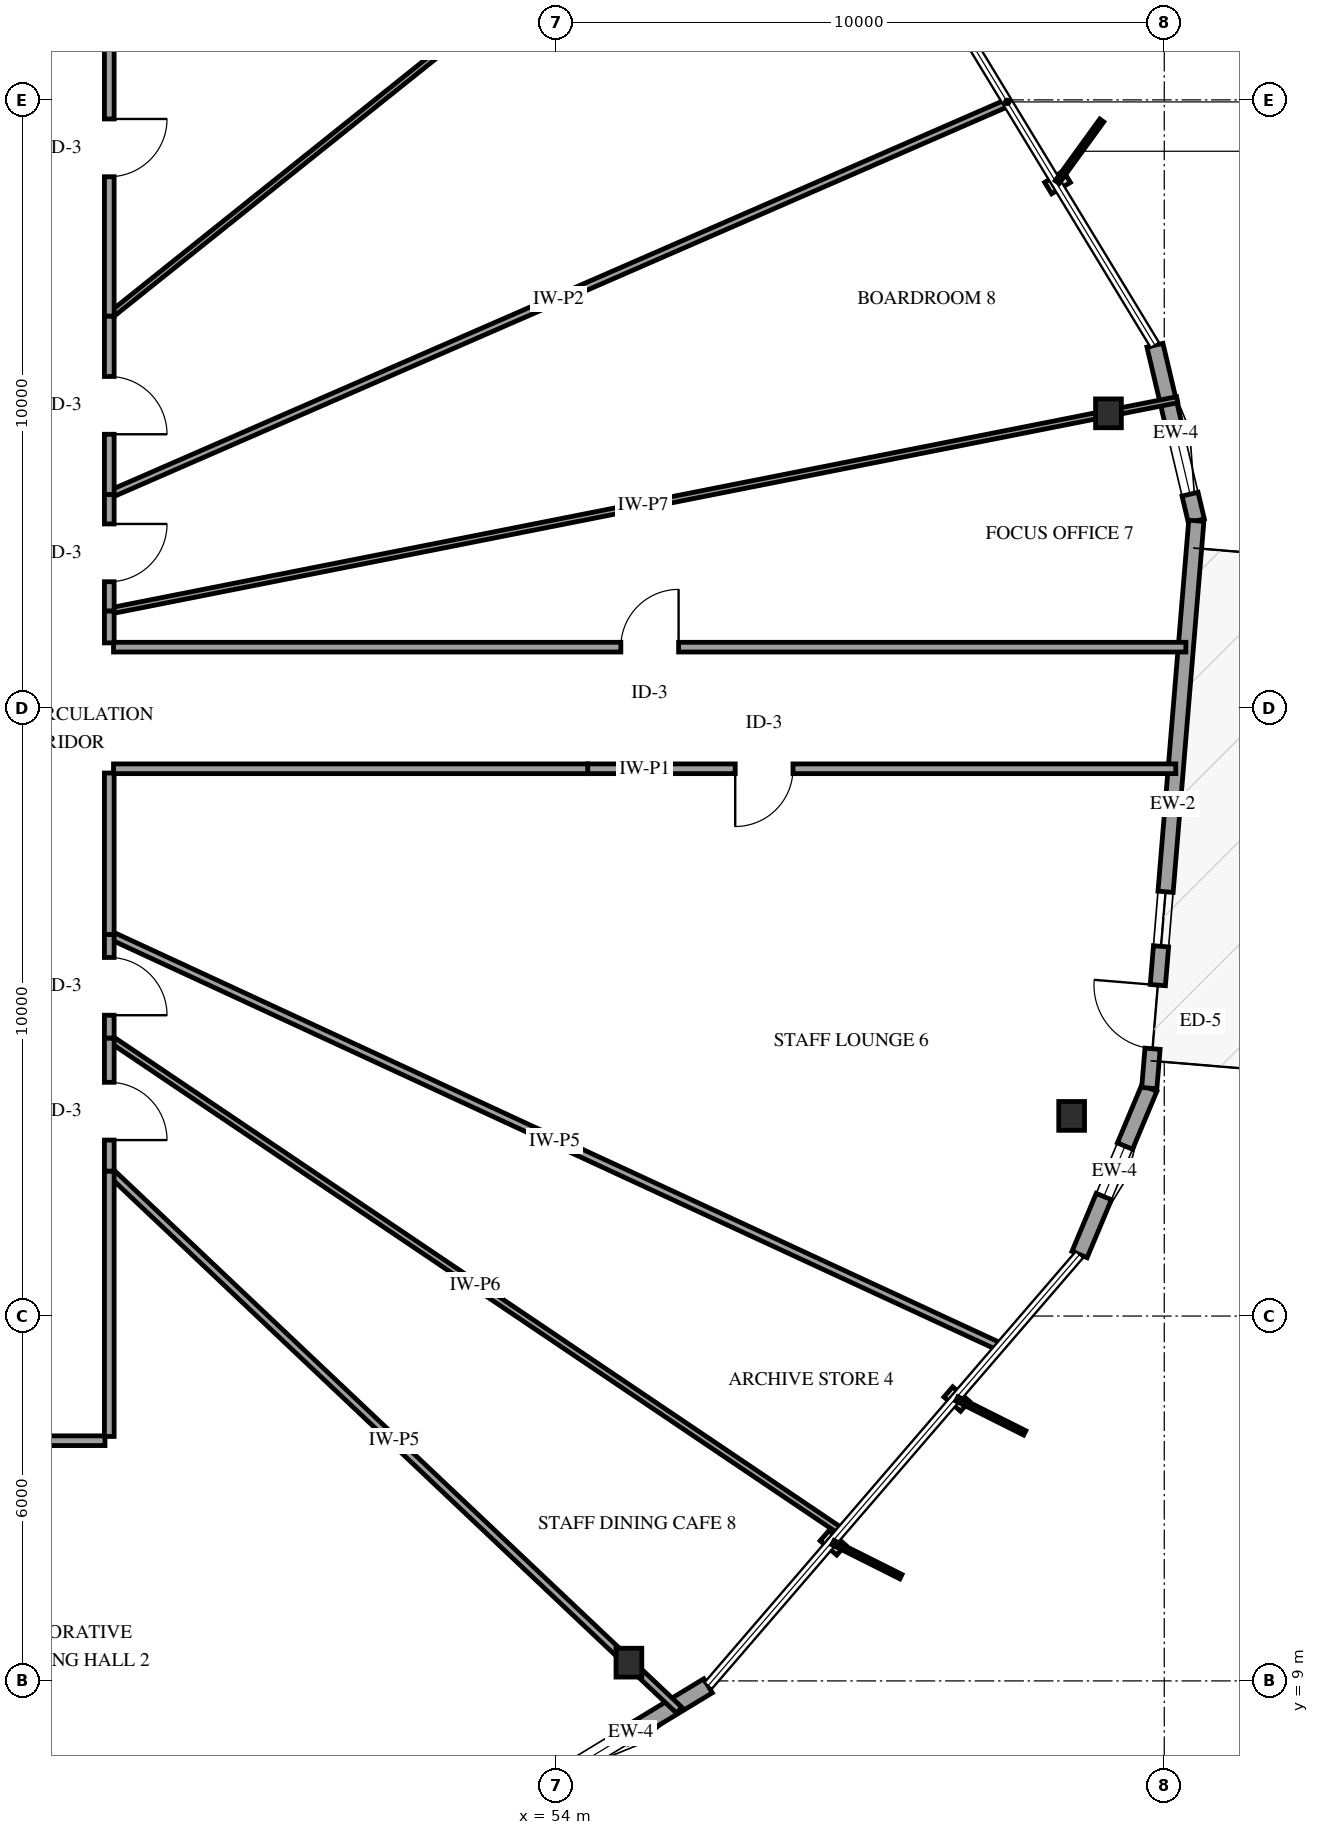
"""IFC4 building model, lengths in metres.
Left out: names, types, materials, properties, quantities, classifications, styles, units other than length and angle.
Written with IfcOpenShell. Run it as: python <this file> out.ifc"""

import sys

from ifc_helpers import new_model, si_unit, direction, frame, frame_2d, origin, origin_2d, place, context, subcontext, project, spatial, rectangle, i_section, extrude, element, fill, save


model = new_model("IFC4")
c1 = context("Model", 3, precision=1e-05, world=origin(), true_north=direction((0.0, 1.0)))
c2 = subcontext(c1, "Body", "Model", "MODEL_VIEW")
j1 = project(units=[si_unit("LENGTHUNIT", "METRE"), si_unit("PLANEANGLEUNIT", "RADIAN")], contexts=[c1])
p1 = place(None, origin())
s1 = spatial("IfcSite", under=j1, at=p1, CompositionType="ELEMENT")
p2 = place(p1, origin())
s2 = spatial("IfcBuilding", under=s1, at=p2, CompositionType="ELEMENT")
p3 = place(p2, frame((0.0, 0.0, 78.6)))
s3 = spatial("IfcBuildingStorey", under=s2, at=p3, CompositionType="ELEMENT", Elevation=78.6)
for number, where, z_axis, x_axis in (
    (1, (63.082, 29.845, 0.0), (0.0, 0.0, 1.0), (1.0, 0.0, 0.0)),
    (2, (55.196, 9.3, 0.0), (0.0, 0.0, 1.0), (1.0, 0.0, 0.0)),
    (3, (62.477, 18.292, 0.0), (0.0, 0.0, 1.0), (1.0, 0.0, 0.0)),
):
    element("IfcColumn", number, at=place(p3, frame(where, z_axis=z_axis, x_axis=x_axis)), inside=s3, PredefinedType="COLUMN", context=c2, shape_type="SweptSolid", body=[
        extrude(i_section(OverallWidth=0.424, OverallDepth=0.474, WebThickness=0.048, FlangeThickness=0.077, FilletRadius=0.038, at=origin_2d()), origin(), (0.0, 0.0, 1.0), 4.0),
    ])
p4 = place(p3, frame((53.961, 7.38, 0.0), z_axis=(0.0, 0.0, 1.0), x_axis=(0.854838363076, 0.518894375584, 0.0)))
e4 = element("IfcWall", 4, at=p4, inside=s3, PredefinedType="SOLIDWALL", context=c2, shape_type="SweptSolid", body=[
    extrude(rectangle(XDim=2.967, YDim=0.27, at=frame_2d((1.483, 0.0))), origin(), (0.0, 0.0, 1.0), 3.039),
])
p5 = place(p4, frame((0.45, 0.0, 0.75)))
e5 = element("IfcOpeningElement", 5, at=p5, cuts=e4, PredefinedType="OPENING", context=c2, shape_type="SweptSolid", body=[
    extrude(rectangle(XDim=0.9, YDim=1.5, at=frame_2d((0.45, 0.75))), frame((0.0, 0.145, 0.0), z_axis=(0.0, -1.0, 0.0), x_axis=(1.0, 0.0, 0.0)), (0.0, 0.0, 1.0), 0.29),
])
p6 = place(p3, frame((62.607, 16.012, 0.0), z_axis=(0.0, 0.0, 1.0), x_axis=(0.386537026706, 0.922273889354, 0.0)))
e6 = element("IfcWall", 6, at=p6, inside=s3, PredefinedType="SOLIDWALL", context=c2, shape_type="SweptSolid", body=[
    extrude(rectangle(XDim=2.967, YDim=0.27, at=frame_2d((1.483, 0.0))), origin(), (0.0, 0.0, 1.0), 3.039),
])
p7 = place(p6, frame((1.033, 0.0, 0.75)))
e7 = element("IfcOpeningElement", 7, at=p7, cuts=e6, PredefinedType="OPENING", context=c2, shape_type="SweptSolid", body=[
    extrude(rectangle(XDim=0.9, YDim=1.5, at=frame_2d((0.45, 0.75))), frame((0.0, 0.145, 0.0), z_axis=(0.0, -1.0, 0.0), x_axis=(1.0, 0.0, 0.0)), (0.0, 0.0, 1.0), 0.29),
])
p8 = place(p3, frame((64.527, 28.078, 0.0), z_axis=(0.0, 0.0, 1.0), x_axis=(-0.229365005804, 0.973340482109, 0.0)))
e8 = element("IfcWall", 8, at=p8, inside=s3, PredefinedType="SOLIDWALL", context=c2, shape_type="SweptSolid", body=[
    extrude(rectangle(XDim=2.967, YDim=0.27, at=frame_2d((1.483, 0.0))), origin(), (0.0, 0.0, 1.0), 3.039),
])
p9 = place(p8, frame((0.45, 0.0, 0.75)))
e9 = element("IfcOpeningElement", 9, at=p9, cuts=e8, PredefinedType="OPENING", context=c2, shape_type="SweptSolid", body=[
    extrude(rectangle(XDim=0.9, YDim=1.5, at=frame_2d((0.45, 0.75))), frame((0.0, 0.145, 0.0), z_axis=(0.0, -1.0, 0.0), x_axis=(1.0, 0.0, 0.0)), (0.0, 0.0, 1.0), 0.29),
])
p10 = place(p3, frame((63.753, 18.748, 0.0), z_axis=(0.0, 0.0, 1.0), x_axis=(0.082620284311, 0.996581099871, 0.0)))
e10 = element("IfcWall", 10, at=p10, inside=s3, PredefinedType="SOLIDWALL", context=c2, shape_type="SweptSolid", body=[
    extrude(rectangle(XDim=9.361, YDim=0.25, at=frame_2d((4.681, 0.0))), origin(), (0.0, 0.0, 1.0), 3.039),
])
p11 = place(p10, frame((0.65, 0.0, 0.0)))
e11 = element("IfcOpeningElement", 11, at=p11, cuts=e10, PredefinedType="OPENING", context=c2, shape_type="SweptSolid", body=[
    extrude(rectangle(XDim=1.05, YDim=2.15, at=frame_2d((0.525, 1.075))), frame((0.0, 0.135, 0.0), z_axis=(0.0, -1.0, 0.0), x_axis=(1.0, 0.0, 0.0)), (0.0, 0.0, 1.0), 0.27),
])
p12 = place(p10, frame((2.34, 0.0, 0.72)))
e12 = element("IfcOpeningElement", 12, at=p12, cuts=e10, PredefinedType="OPENING", context=c2, shape_type="SweptSolid", body=[
    extrude(rectangle(XDim=0.9, YDim=1.5, at=frame_2d((0.45, 0.75))), frame((0.0, 0.135, 0.0), z_axis=(0.0, -1.0, 0.0), x_axis=(1.0, 0.0, 0.0)), (0.0, 0.0, 1.0), 0.27),
])
p13 = place(p3, frame((46.65, 26.593, 0.0), z_axis=(0.0, 0.0, 1.0), x_axis=(0.98097102079, 0.194154207707, 0.0)))
e13 = element("IfcWall", 13, at=p13, inside=s3, PredefinedType="PARTITIONING", context=c2, shape_type="SweptSolid", body=[
    extrude(rectangle(XDim=17.904, YDim=0.1, at=frame_2d((8.952, 0.0))), origin(), (0.0, 0.0, 1.0), 2.955),
])
p14 = place(p3, frame((46.72, 26.0, 0.0), z_axis=(0.0, 0.0, 1.0), x_axis=(1.0, 0.0, 0.0)))
e14 = element("IfcWall", 14, at=p14, inside=s3, PredefinedType="PARTITIONING", context=c2, shape_type="SweptSolid", body=[
    extrude(rectangle(XDim=17.635, YDim=0.16, at=frame_2d((8.817, 0.0))), origin(), (0.0, 0.0, 1.0), 3.66),
])
p15 = place(p14, frame((8.343, 0.0, 0.0)))
e15 = element("IfcOpeningElement", 15, at=p15, cuts=e14, PredefinedType="OPENING", context=c2, shape_type="SweptSolid", body=[
    extrude(rectangle(XDim=0.95, YDim=2.15, at=frame_2d((0.475, 1.075))), frame((0.0, 0.09, 0.0), z_axis=(0.0, -1.0, 0.0), x_axis=(1.0, 0.0, 0.0)), (0.0, 0.0, 1.0), 0.18),
])
p16 = place(p3, frame((46.65, 21.273, 0.0), z_axis=(0.0, 0.0, 1.0), x_axis=(0.90750331807, -0.420044911517, 0.0)))
e16 = element("IfcWall", 16, at=p16, inside=s3, PredefinedType="PARTITIONING", context=c2, shape_type="SweptSolid", body=[
    extrude(rectangle(XDim=16.141, YDim=0.13, at=frame_2d((8.071, 0.0))), origin(), (0.0, 0.0, 1.0), 3.66),
])
p17 = place(p3, frame((46.65, 28.509, 0.0), z_axis=(0.0, 0.0, 1.0), x_axis=(0.916650580897, 0.39968952018, 0.0)))
e17 = element("IfcWall", 17, at=p17, inside=s3, PredefinedType="PARTITIONING", context=c2, shape_type="SweptSolid", body=[
    extrude(rectangle(XDim=16.12, YDim=0.12, at=frame_2d((8.06, 0.0))), origin(), (0.0, 0.0, 1.0), 3.66),
])
p18 = place(p3, frame((46.65, 19.572, 0.0), z_axis=(0.0, 0.0, 1.0), x_axis=(0.82919016121, -0.558966614881, 0.0)))
e18 = element("IfcWall", 18, at=p18, inside=s3, PredefinedType="PARTITIONING", context=c2, shape_type="SweptSolid", body=[
    extrude(rectangle(XDim=14.514, YDim=0.11, at=frame_2d((7.257, 0.0))), origin(), (0.0, 0.0, 1.0), 3.66),
])
p19 = place(p3, frame((46.65, 31.442, 0.0), z_axis=(0.0, 0.0, 1.0), x_axis=(0.780803279634, 0.62477695101, 0.0)))
e19 = element("IfcWall", 19, at=p19, inside=s3, PredefinedType="PARTITIONING", context=c2, shape_type="SweptSolid", body=[
    extrude(rectangle(XDim=14.177, YDim=0.1, at=frame_2d((7.088, 0.0))), origin(), (0.0, 0.0, 1.0), 3.66),
])
p20 = place(p3, frame((46.58, 12.95, 0.0), z_axis=(0.0, 0.0, 1.0), x_axis=(-1.0, 0.0, 0.0)))
e20 = element("IfcWall", 20, at=p20, inside=s3, PredefinedType="PARTITIONING", context=c2, shape_type="SweptSolid", body=[
    extrude(rectangle(XDim=13.91, YDim=0.16, at=frame_2d((6.955, 0.0))), origin(), (0.0, 0.0, 1.0), 3.66),
])
p21 = place(p20, frame((6.48, 0.0, 0.0)))
e21 = element("IfcOpeningElement", 21, at=p21, cuts=e20, PredefinedType="OPENING", context=c2, shape_type="SweptSolid", body=[
    extrude(rectangle(XDim=0.95, YDim=2.15, at=frame_2d((0.475, 1.075))), frame((0.0, 0.09, 0.0), z_axis=(0.0, -1.0, 0.0), x_axis=(1.0, 0.0, 0.0)), (0.0, 0.0, 1.0), 0.18),
])
p22 = place(p3, frame((46.65, 17.384, 0.0), z_axis=(0.0, 0.0, 1.0), x_axis=(0.726485012511, -0.687182309578, 0.0)))
e22 = element("IfcWall", 22, at=p22, inside=s3, PredefinedType="PARTITIONING", context=c2, shape_type="SweptSolid", body=[
    extrude(rectangle(XDim=12.902, YDim=0.13, at=frame_2d((6.451, 0.0))), origin(), (0.0, 0.0, 1.0), 2.955),
])
p23 = place(p3, frame((64.189, 24.0, 0.0), z_axis=(0.0, 0.0, 1.0), x_axis=(-1.0, 0.0, 0.0)))
e23 = element("IfcWall", 23, at=p23, inside=s3, PredefinedType="PARTITIONING", context=c2, shape_type="SweptSolid", body=[
    extrude(rectangle(XDim=9.671, YDim=0.16, at=frame_2d((4.835, 0.0))), origin(), (0.0, 0.0, 1.0), 3.66),
])
p24 = place(p23, frame((6.295, 0.0, 0.0)))
e24 = element("IfcOpeningElement", 24, at=p24, cuts=e23, PredefinedType="OPENING", context=c2, shape_type="SweptSolid", body=[
    extrude(rectangle(XDim=0.95, YDim=2.15, at=frame_2d((0.475, 1.075))), frame((0.0, 0.09, 0.0), z_axis=(0.0, -1.0, 0.0), x_axis=(1.0, 0.0, 0.0)), (0.0, 0.0, 1.0), 0.18),
])
p25 = place(p3, frame((54.518, 24.0, 0.0), z_axis=(0.0, 0.0, 1.0), x_axis=(-1.0, 0.0, 0.0)))
e25 = element("IfcWall", 25, at=p25, inside=s3, PredefinedType="PARTITIONING", context=c2, shape_type="SweptSolid", body=[
    extrude(rectangle(XDim=7.798, YDim=0.16, at=frame_2d((3.899, 0.0))), origin(), (0.0, 0.0, 1.0), 3.66),
])
p26 = place(p3, frame((46.65, 36.98, 0.0), z_axis=(0.0, 0.0, 1.0), x_axis=(0.0, -1.0, 0.0)))
e26 = element("IfcWall", 26, at=p26, inside=s3, PredefinedType="PARTITIONING", context=c2, shape_type="SweptSolid", body=[
    extrude(rectangle(XDim=5.538, YDim=0.16, at=frame_2d((2.769, 0.0))), origin(), (0.0, 0.0, 1.0), 3.66),
])
p27 = place(p26, frame((2.294, 0.0, 0.0)))
e27 = element("IfcOpeningElement", 27, at=p27, cuts=e26, PredefinedType="OPENING", context=c2, shape_type="SweptSolid", body=[
    extrude(rectangle(XDim=0.95, YDim=2.15, at=frame_2d((0.475, 1.075))), frame((0.0, 0.09, 0.0), z_axis=(0.0, -1.0, 0.0), x_axis=(1.0, 0.0, 0.0)), (0.0, 0.0, 1.0), 0.18),
])
p28 = place(p3, frame((46.65, 17.384, 0.0), z_axis=(0.0, 0.0, 1.0), x_axis=(0.0, -1.0, 0.0)))
e28 = element("IfcWall", 28, at=p28, inside=s3, PredefinedType="PARTITIONING", context=c2, shape_type="SweptSolid", body=[
    extrude(rectangle(XDim=4.364, YDim=0.16, at=frame_2d((2.182, 0.0))), origin(), (0.0, 0.0, 1.0), 3.66),
])
p29 = place(p3, frame((46.65, 31.442, 0.0), z_axis=(0.0, 0.0, 1.0), x_axis=(0.0, -1.0, 0.0)))
e29 = element("IfcWall", 29, at=p29, inside=s3, PredefinedType="PARTITIONING", context=c2, shape_type="SweptSolid", body=[
    extrude(rectangle(XDim=2.933, YDim=0.16, at=frame_2d((1.466, 0.0))), origin(), (0.0, 0.0, 1.0), 3.66),
])
p30 = place(p29, frame((0.991, 0.0, 0.0)))
e30 = element("IfcOpeningElement", 30, at=p30, cuts=e29, PredefinedType="OPENING", context=c2, shape_type="SweptSolid", body=[
    extrude(rectangle(XDim=0.95, YDim=2.15, at=frame_2d((0.475, 1.075))), frame((0.0, 0.09, 0.0), z_axis=(0.0, -1.0, 0.0), x_axis=(1.0, 0.0, 0.0)), (0.0, 0.0, 1.0), 0.18),
])
p31 = place(p3, frame((46.65, 23.93, 0.0), z_axis=(0.0, 0.0, 1.0), x_axis=(0.0, -1.0, 0.0)))
e31 = element("IfcWall", 31, at=p31, inside=s3, PredefinedType="PARTITIONING", context=c2, shape_type="SweptSolid", body=[
    extrude(rectangle(XDim=2.657, YDim=0.16, at=frame_2d((1.329, 0.0))), origin(), (0.0, 0.0, 1.0), 3.66),
])
p32 = place(p3, frame((46.65, 19.572, 0.0), z_axis=(0.0, 0.0, 1.0), x_axis=(0.0, -1.0, 0.0)))
e32 = element("IfcWall", 32, at=p32, inside=s3, PredefinedType="PARTITIONING", context=c2, shape_type="SweptSolid", body=[
    extrude(rectangle(XDim=2.188, YDim=0.16, at=frame_2d((1.094, 0.0))), origin(), (0.0, 0.0, 1.0), 3.66),
])
p33 = place(p32, frame((0.728, 0.0, 0.0)))
e33 = element("IfcOpeningElement", 33, at=p33, cuts=e32, PredefinedType="OPENING", context=c2, shape_type="SweptSolid", body=[
    extrude(rectangle(XDim=0.95, YDim=2.15, at=frame_2d((0.475, 1.075))), frame((0.0, 0.09, 0.0), z_axis=(0.0, -1.0, 0.0), x_axis=(1.0, 0.0, 0.0)), (0.0, 0.0, 1.0), 0.18),
])
p34 = place(p3, frame((46.65, 28.509, 0.0), z_axis=(0.0, 0.0, 1.0), x_axis=(0.0, -1.0, 0.0)))
e34 = element("IfcWall", 34, at=p34, inside=s3, PredefinedType="PARTITIONING", context=c2, shape_type="SweptSolid", body=[
    extrude(rectangle(XDim=1.916, YDim=0.16, at=frame_2d((0.958, 0.0))), origin(), (0.0, 0.0, 1.0), 3.66),
])
p35 = place(p34, frame((0.483, 0.0, 0.0)))
e35 = element("IfcOpeningElement", 35, at=p35, cuts=e34, PredefinedType="OPENING", context=c2, shape_type="SweptSolid", body=[
    extrude(rectangle(XDim=0.95, YDim=2.15, at=frame_2d((0.475, 1.075))), frame((0.0, 0.09, 0.0), z_axis=(0.0, -1.0, 0.0), x_axis=(1.0, 0.0, 0.0)), (0.0, 0.0, 1.0), 0.18),
])
p36 = place(p3, frame((46.65, 21.273, 0.0), z_axis=(0.0, 0.0, 1.0), x_axis=(0.0, -1.0, 0.0)))
e36 = element("IfcWall", 36, at=p36, inside=s3, PredefinedType="PARTITIONING", context=c2, shape_type="SweptSolid", body=[
    extrude(rectangle(XDim=1.701, YDim=0.16, at=frame_2d((0.851, 0.0))), origin(), (0.0, 0.0, 1.0), 3.66),
])
p37 = place(p36, frame((0.376, 0.0, 0.0)))
e37 = element("IfcOpeningElement", 37, at=p37, cuts=e36, PredefinedType="OPENING", context=c2, shape_type="SweptSolid", body=[
    extrude(rectangle(XDim=0.95, YDim=2.15, at=frame_2d((0.475, 1.075))), frame((0.0, 0.09, 0.0), z_axis=(0.0, -1.0, 0.0), x_axis=(1.0, 0.0, 0.0)), (0.0, 0.0, 1.0), 0.18),
])
p38 = place(p3, frame((46.65, 26.593, 0.0), z_axis=(0.0, 0.0, 1.0), x_axis=(0.0, -1.0, 0.0)))
e38 = element("IfcWall", 38, at=p38, inside=s3, PredefinedType="PARTITIONING", context=c2, shape_type="SweptSolid", body=[
    extrude(rectangle(XDim=0.523, YDim=0.16, at=frame_2d((0.261, 0.0))), origin(), (0.0, 0.0, 1.0), 3.66),
])
p39 = place(p5, origin())
e39 = element("IfcWindow", 39, at=p39, inside=s3, PartitioningType="SINGLE_PANEL", PredefinedType="WINDOW", context=c2, shape_type="SweptSolid", body=[
    extrude(rectangle(XDim=0.9, YDim=1.5, at=frame_2d((0.45, 0.75))), frame((0.0, 0.03, 0.0), z_axis=(0.0, -1.0, 0.0), x_axis=(1.0, 0.0, 0.0)), (0.0, 0.0, 1.0), 0.06),
])
fill(e5, e39)
p40 = place(p7, origin())
e40 = element("IfcWindow", 40, at=p40, inside=s3, PartitioningType="SINGLE_PANEL", PredefinedType="WINDOW", context=c2, shape_type="SweptSolid", body=[
    extrude(rectangle(XDim=0.9, YDim=1.5, at=frame_2d((0.45, 0.75))), frame((0.0, 0.03, 0.0), z_axis=(0.0, -1.0, 0.0), x_axis=(1.0, 0.0, 0.0)), (0.0, 0.0, 1.0), 0.06),
])
fill(e7, e40)
p41 = place(p9, origin())
e41 = element("IfcWindow", 41, at=p41, inside=s3, PartitioningType="SINGLE_PANEL", PredefinedType="WINDOW", context=c2, shape_type="SweptSolid", body=[
    extrude(rectangle(XDim=0.9, YDim=1.5, at=frame_2d((0.45, 0.75))), frame((0.0, 0.03, 0.0), z_axis=(0.0, -1.0, 0.0), x_axis=(1.0, 0.0, 0.0)), (0.0, 0.0, 1.0), 0.06),
])
fill(e9, e41)
p42 = place(p11, origin())
e42 = element("IfcDoor", 42, at=p42, inside=s3, OperationType="SINGLE_SWING_RIGHT", PredefinedType="DOOR", context=c2, shape_type="SweptSolid", body=[
    extrude(rectangle(XDim=1.05, YDim=2.15, at=frame_2d((0.525, 1.075))), frame((0.0, 0.025, 0.0), z_axis=(0.0, -1.0, 0.0), x_axis=(1.0, 0.0, 0.0)), (0.0, 0.0, 1.0), 0.05),
])
fill(e11, e42)
p43 = place(p12, origin())
e43 = element("IfcWindow", 43, at=p43, inside=s3, PartitioningType="SINGLE_PANEL", PredefinedType="WINDOW", context=c2, shape_type="SweptSolid", body=[
    extrude(rectangle(XDim=0.9, YDim=1.5, at=frame_2d((0.45, 0.75))), frame((0.0, 0.03, 0.0), z_axis=(0.0, -1.0, 0.0), x_axis=(1.0, 0.0, 0.0)), (0.0, 0.0, 1.0), 0.06),
])
fill(e12, e43)
p44 = place(p15, origin())
e44 = element("IfcDoor", 44, at=p44, inside=s3, OperationType="SINGLE_SWING_RIGHT", PredefinedType="DOOR", context=c2, shape_type="SweptSolid", body=[
    extrude(rectangle(XDim=0.95, YDim=2.15, at=frame_2d((0.475, 1.075))), frame((0.0, 0.025, 0.0), z_axis=(0.0, -1.0, 0.0), x_axis=(1.0, 0.0, 0.0)), (0.0, 0.0, 1.0), 0.05),
])
fill(e15, e44)
p45 = place(p24, origin())
e45 = element("IfcDoor", 45, at=p45, inside=s3, OperationType="SINGLE_SWING_RIGHT", PredefinedType="DOOR", context=c2, shape_type="SweptSolid", body=[
    extrude(rectangle(XDim=0.95, YDim=2.15, at=frame_2d((0.475, 1.075))), frame((0.0, 0.025, 0.0), z_axis=(0.0, -1.0, 0.0), x_axis=(1.0, 0.0, 0.0)), (0.0, 0.0, 1.0), 0.05),
])
fill(e24, e45)
p46 = place(p27, origin())
e46 = element("IfcDoor", 46, at=p46, inside=s3, OperationType="SINGLE_SWING_LEFT", PredefinedType="DOOR", context=c2, shape_type="SweptSolid", body=[
    extrude(rectangle(XDim=0.95, YDim=2.15, at=frame_2d((0.475, 1.075))), frame((0.0, 0.025, 0.0), z_axis=(0.0, -1.0, 0.0), x_axis=(1.0, 0.0, 0.0)), (0.0, 0.0, 1.0), 0.05),
])
fill(e27, e46)
p47 = place(p30, origin())
e47 = element("IfcDoor", 47, at=p47, inside=s3, OperationType="SINGLE_SWING_RIGHT", PredefinedType="DOOR", context=c2, shape_type="SweptSolid", body=[
    extrude(rectangle(XDim=0.95, YDim=2.15, at=frame_2d((0.475, 1.075))), frame((0.0, 0.025, 0.0), z_axis=(0.0, -1.0, 0.0), x_axis=(1.0, 0.0, 0.0)), (0.0, 0.0, 1.0), 0.05),
])
fill(e30, e47)
p48 = place(p33, origin())
e48 = element("IfcDoor", 48, at=p48, inside=s3, OperationType="SINGLE_SWING_RIGHT", PredefinedType="DOOR", context=c2, shape_type="SweptSolid", body=[
    extrude(rectangle(XDim=0.95, YDim=2.15, at=frame_2d((0.475, 1.075))), frame((0.0, 0.025, 0.0), z_axis=(0.0, -1.0, 0.0), x_axis=(1.0, 0.0, 0.0)), (0.0, 0.0, 1.0), 0.05),
])
fill(e33, e48)
p49 = place(p35, origin())
e49 = element("IfcDoor", 49, at=p49, inside=s3, OperationType="SINGLE_SWING_LEFT", PredefinedType="DOOR", context=c2, shape_type="SweptSolid", body=[
    extrude(rectangle(XDim=0.95, YDim=2.15, at=frame_2d((0.475, 1.075))), frame((0.0, 0.025, 0.0), z_axis=(0.0, -1.0, 0.0), x_axis=(1.0, 0.0, 0.0)), (0.0, 0.0, 1.0), 0.05),
])
fill(e35, e49)
p50 = place(p37, origin())
e50 = element("IfcDoor", 50, at=p50, inside=s3, OperationType="SINGLE_SWING_RIGHT", PredefinedType="DOOR", context=c2, shape_type="SweptSolid", body=[
    extrude(rectangle(XDim=0.95, YDim=2.15, at=frame_2d((0.475, 1.075))), frame((0.0, 0.025, 0.0), z_axis=(0.0, -1.0, 0.0), x_axis=(1.0, 0.0, 0.0)), (0.0, 0.0, 1.0), 0.05),
])
fill(e37, e50)
save(model, sys.argv[1])
